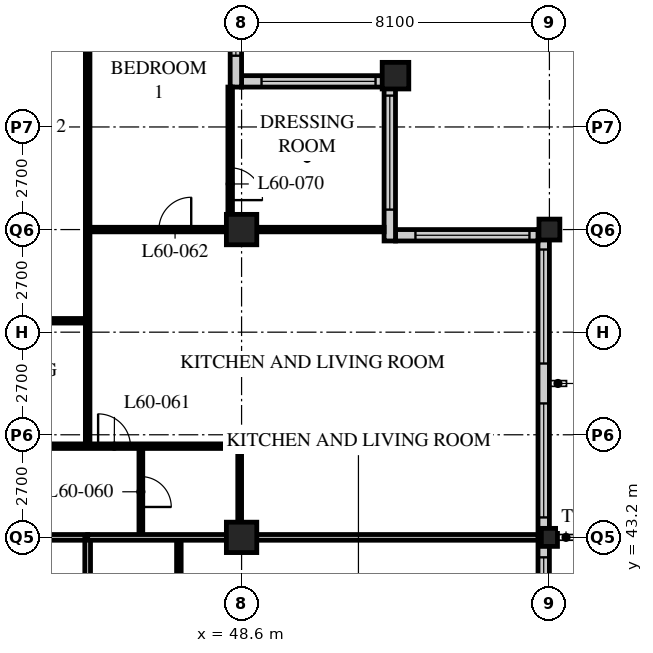
"""IFC4 building model, lengths in metres.
Left out: names, types, materials, properties, quantities, classifications, styles, units other than length and angle.
Written with IfcOpenShell. Run it as: python <this file> out.ifc"""

import sys

from ifc_helpers import new_model, si_unit, direction, frame, frame_2d, origin, origin_2d, place, context, subcontext, project, spatial, rectangle, hollow_rectangle, i_section, extrude, element, fill, save


model = new_model("IFC4")
c1 = context("Model", 3, precision=1e-05, world=origin(), true_north=direction((0.0, 1.0)))
c2 = subcontext(c1, "Body", "Model", "MODEL_VIEW")
j1 = project(units=[si_unit("LENGTHUNIT", "METRE"), si_unit("PLANEANGLEUNIT", "RADIAN")], contexts=[c1])
p1 = place(None, origin())
s1 = spatial("IfcSite", under=j1, at=p1, CompositionType="ELEMENT")
p2 = place(p1, origin())
s2 = spatial("IfcBuilding", under=s1, at=p2, CompositionType="ELEMENT")
p3 = place(p2, frame((0.0, 0.0, 231.6)))
s3 = spatial("IfcBuildingStorey", under=s2, at=p3, CompositionType="ELEMENT", Elevation=231.6)
for number, where, z_axis, x_axis in (
    (1, (48.6, 43.2, 0.0), (0.0, 0.0, 1.0), (1.0, 0.0, 0.0)),
    (2, (48.6, 51.3, 0.0), (0.0, 0.0, 1.0), (1.0, 0.0, 0.0)),
):
    element("IfcColumn", number, at=place(p3, frame(where, z_axis=z_axis, x_axis=x_axis)), inside=s3, PredefinedType="COLUMN", context=c2, shape_type="SweptSolid", body=[
        extrude(hollow_rectangle(XDim=0.8, YDim=0.8, WallThickness=0.08, at=origin_2d()), origin(), (0.0, 0.0, 1.0), 3.6),
    ])
p4 = place(p3, frame((52.65, 55.35, 0.0), z_axis=(0.0, 0.0, 1.0), x_axis=(1.0, 0.0, 0.0)))
e3 = element("IfcColumn", 3, at=p4, inside=s3, PredefinedType="COLUMN", context=c2, shape_type="SweptSolid", body=[
    extrude(hollow_rectangle(XDim=0.7, YDim=0.7, WallThickness=0.07, at=origin_2d()), origin(), (0.0, 0.0, 1.0), 3.6),
])
p5 = place(p3, frame((56.7, 43.2, 0.0), z_axis=(0.0, 0.0, 1.0), x_axis=(1.0, 0.0, 0.0)))
e4 = element("IfcColumn", 4, at=p5, inside=s3, PredefinedType="COLUMN", context=c2, shape_type="SweptSolid", body=[
    extrude(i_section(OverallWidth=0.424, OverallDepth=0.475, WebThickness=0.048, FlangeThickness=0.077, FilletRadius=0.015, at=origin_2d()), origin(), (0.0, 0.0, 1.0), 3.6),
])
p6 = place(p3, frame((56.7, 51.3, 0.0), z_axis=(0.0, 0.0, 1.0), x_axis=(1.0, 0.0, 0.0)))
e5 = element("IfcColumn", 5, at=p6, inside=s3, PredefinedType="COLUMN", context=c2, shape_type="SweptSolid", body=[
    extrude(hollow_rectangle(XDim=0.55, YDim=0.55, WallThickness=0.045, at=origin_2d()), origin(), (0.0, 0.0, 1.0), 3.6),
])
p7 = place(p3, frame((56.55, 19.2, 0.0), z_axis=(0.0, 0.0, 1.0), x_axis=(0.0, 1.0, 0.0)))
e6 = element("IfcWall", 6, at=p7, inside=s3, PredefinedType="SOLIDWALL", context=c2, shape_type="SweptSolid", body=[
    extrude(rectangle(XDim=32.1, YDim=0.3, at=frame_2d((16.05, 0.0))), origin(), (0.0, 0.0, 1.0), 2.35),
])
p8 = place(p7, frame((0.225, 0.0, 0.6)))
e7 = element("IfcOpeningElement", 7, at=p8, cuts=e6, PredefinedType="OPENING", context=c2, shape_type="SweptSolid", body=[
    extrude(rectangle(XDim=3.0, YDim=1.7, at=frame_2d((1.5, 0.85))), frame((0.0, 0.16, 0.0), z_axis=(0.0, -1.0, 0.0), x_axis=(1.0, 0.0, 0.0)), (0.0, 0.0, 1.0), 0.32),
])
p9 = place(p7, frame((4.275, 0.0, 0.6)))
e8 = element("IfcOpeningElement", 8, at=p9, cuts=e6, PredefinedType="OPENING", context=c2, shape_type="SweptSolid", body=[
    extrude(rectangle(XDim=3.0, YDim=1.7, at=frame_2d((1.5, 0.85))), frame((0.0, 0.16, 0.0), z_axis=(0.0, -1.0, 0.0), x_axis=(1.0, 0.0, 0.0)), (0.0, 0.0, 1.0), 0.32),
])
p10 = place(p7, frame((8.325, 0.0, 0.6)))
e9 = element("IfcOpeningElement", 9, at=p10, cuts=e6, PredefinedType="OPENING", context=c2, shape_type="SweptSolid", body=[
    extrude(rectangle(XDim=3.0, YDim=1.7, at=frame_2d((1.5, 0.85))), frame((0.0, 0.16, 0.0), z_axis=(0.0, -1.0, 0.0), x_axis=(1.0, 0.0, 0.0)), (0.0, 0.0, 1.0), 0.32),
])
p11 = place(p7, frame((12.375, 0.0, 0.6)))
e10 = element("IfcOpeningElement", 10, at=p11, cuts=e6, PredefinedType="OPENING", context=c2, shape_type="SweptSolid", body=[
    extrude(rectangle(XDim=3.0, YDim=1.7, at=frame_2d((1.5, 0.85))), frame((0.0, 0.16, 0.0), z_axis=(0.0, -1.0, 0.0), x_axis=(1.0, 0.0, 0.0)), (0.0, 0.0, 1.0), 0.32),
])
p12 = place(p7, frame((16.425, 0.0, 0.6)))
e11 = element("IfcOpeningElement", 11, at=p12, cuts=e6, PredefinedType="OPENING", context=c2, shape_type="SweptSolid", body=[
    extrude(rectangle(XDim=3.0, YDim=1.7, at=frame_2d((1.5, 0.85))), frame((0.0, 0.16, 0.0), z_axis=(0.0, -1.0, 0.0), x_axis=(1.0, 0.0, 0.0)), (0.0, 0.0, 1.0), 0.32),
])
p13 = place(p7, frame((20.475, 0.0, 0.6)))
e12 = element("IfcOpeningElement", 12, at=p13, cuts=e6, PredefinedType="OPENING", context=c2, shape_type="SweptSolid", body=[
    extrude(rectangle(XDim=3.0, YDim=1.7, at=frame_2d((1.5, 0.85))), frame((0.0, 0.16, 0.0), z_axis=(0.0, -1.0, 0.0), x_axis=(1.0, 0.0, 0.0)), (0.0, 0.0, 1.0), 0.32),
])
p14 = place(p7, frame((24.525, 0.0, 0.6)))
e13 = element("IfcOpeningElement", 13, at=p14, cuts=e6, PredefinedType="OPENING", context=c2, shape_type="SweptSolid", body=[
    extrude(rectangle(XDim=3.0, YDim=1.7, at=frame_2d((1.5, 0.85))), frame((0.0, 0.16, 0.0), z_axis=(0.0, -1.0, 0.0), x_axis=(1.0, 0.0, 0.0)), (0.0, 0.0, 1.0), 0.32),
])
p15 = place(p7, frame((28.575, 0.0, 0.6)))
e14 = element("IfcOpeningElement", 14, at=p15, cuts=e6, PredefinedType="OPENING", context=c2, shape_type="SweptSolid", body=[
    extrude(rectangle(XDim=3.0, YDim=1.7, at=frame_2d((1.5, 0.85))), frame((0.0, 0.16, 0.0), z_axis=(0.0, -1.0, 0.0), x_axis=(1.0, 0.0, 0.0)), (0.0, 0.0, 1.0), 0.32),
])
p16 = place(p3, frame((56.4, 51.15, 0.0), z_axis=(0.0, 0.0, 1.0), x_axis=(-1.0, 0.0, 0.0)))
e15 = element("IfcWall", 15, at=p16, inside=s3, PredefinedType="SOLIDWALL", context=c2, shape_type="SweptSolid", body=[
    extrude(rectangle(XDim=3.75, YDim=0.3, at=frame_2d((1.875, 0.0))), origin(), (0.0, 0.0, 1.0), 3.35),
])
p17 = place(p16, frame((0.225, 0.0, 0.6)))
e16 = element("IfcOpeningElement", 16, at=p17, cuts=e15, PredefinedType="OPENING", context=c2, shape_type="SweptSolid", body=[
    extrude(rectangle(XDim=3.0, YDim=1.7, at=frame_2d((1.5, 0.85))), frame((0.0, 0.16, 0.0), z_axis=(0.0, -1.0, 0.0), x_axis=(1.0, 0.0, 0.0)), (0.0, 0.0, 1.0), 0.32),
])
p18 = place(p3, frame((52.5, 51.0, 0.0), z_axis=(0.0, 0.0, 1.0), x_axis=(0.0, 1.0, 0.0)))
e17 = element("IfcWall", 17, at=p18, inside=s3, PredefinedType="SOLIDWALL", context=c2, shape_type="SweptSolid", body=[
    extrude(rectangle(XDim=4.35, YDim=0.3, at=frame_2d((2.175, 0.0))), origin(), (0.0, 0.0, 1.0), 2.65),
])
p19 = place(p18, frame((0.825, 0.0, 0.6)))
e18 = element("IfcOpeningElement", 18, at=p19, cuts=e17, PredefinedType="OPENING", context=c2, shape_type="SweptSolid", body=[
    extrude(rectangle(XDim=3.0, YDim=1.7, at=frame_2d((1.5, 0.85))), frame((0.0, 0.16, 0.0), z_axis=(0.0, -1.0, 0.0), x_axis=(1.0, 0.0, 0.0)), (0.0, 0.0, 1.0), 0.32),
])
p20 = place(p3, frame((52.35, 55.2, 0.0), z_axis=(0.0, 0.0, 1.0), x_axis=(-1.0, 0.0, 0.0)))
e19 = element("IfcWall", 19, at=p20, inside=s3, PredefinedType="SOLIDWALL", context=c2, shape_type="SweptSolid", body=[
    extrude(rectangle(XDim=3.75, YDim=0.3, at=frame_2d((1.875, 0.0))), origin(), (0.0, 0.0, 1.0), 2.65),
])
p21 = place(p20, frame((0.225, 0.0, 0.6)))
e20 = element("IfcOpeningElement", 20, at=p21, cuts=e19, PredefinedType="OPENING", context=c2, shape_type="SweptSolid", body=[
    extrude(rectangle(XDim=3.0, YDim=1.7, at=frame_2d((1.5, 0.85))), frame((0.0, 0.16, 0.0), z_axis=(0.0, -1.0, 0.0), x_axis=(1.0, 0.0, 0.0)), (0.0, 0.0, 1.0), 0.32),
])
p22 = place(p3, frame((48.45, 55.05, 0.0), z_axis=(0.0, 0.0, 1.0), x_axis=(0.0, 1.0, 0.0)))
e21 = element("IfcWall", 21, at=p22, inside=s3, PredefinedType="SOLIDWALL", context=c2, shape_type="SweptSolid", body=[
    extrude(rectangle(XDim=4.35, YDim=0.3, at=frame_2d((2.175, 0.0))), origin(), (0.0, 0.0, 1.0), 2.35),
])
p23 = place(p22, frame((0.825, 0.0, 0.6)))
e22 = element("IfcOpeningElement", 22, at=p23, cuts=e21, PredefinedType="OPENING", context=c2, shape_type="SweptSolid", body=[
    extrude(rectangle(XDim=3.0, YDim=1.7, at=frame_2d((1.5, 0.85))), frame((0.0, 0.16, 0.0), z_axis=(0.0, -1.0, 0.0), x_axis=(1.0, 0.0, 0.0)), (0.0, 0.0, 1.0), 0.32),
])
p24 = place(p3, frame((8.1, 43.2, 0.0), z_axis=(0.0, 0.0, 1.0), x_axis=(1.0, 0.0, 0.0)))
e23 = element("IfcWall", 23, at=p24, inside=s3, PredefinedType="PARTITIONING", context=c2, shape_type="SweptSolid", body=[
    extrude(rectangle(XDim=36.45, YDim=0.15, at=frame_2d((18.225, 0.0))), origin(), (0.0, 0.0, 1.0), 2.35),
])
p25 = place(p24, frame((4.45, 0.0, 0.0)))
e24 = element("IfcOpeningElement", 24, at=p25, cuts=e23, PredefinedType="OPENING", context=c2, shape_type="SweptSolid", body=[
    extrude(rectangle(XDim=1.0, YDim=2.1, at=frame_2d((0.5, 1.05))), frame((0.0, 0.085, 0.0), z_axis=(0.0, -1.0, 0.0), x_axis=(1.0, 0.0, 0.0)), (0.0, 0.0, 1.0), 0.17),
])
p26 = place(p24, frame((17.1, 0.0, 0.0)))
e25 = element("IfcOpeningElement", 25, at=p26, cuts=e23, PredefinedType="OPENING", context=c2, shape_type="SweptSolid", body=[
    extrude(rectangle(XDim=1.0, YDim=2.1, at=frame_2d((0.5, 1.05))), frame((0.0, 0.085, 0.0), z_axis=(0.0, -1.0, 0.0), x_axis=(1.0, 0.0, 0.0)), (0.0, 0.0, 1.0), 0.17),
])
p27 = place(p24, frame((29.05, 0.0, 0.0)))
e26 = element("IfcOpeningElement", 26, at=p27, cuts=e23, PredefinedType="OPENING", context=c2, shape_type="SweptSolid", body=[
    extrude(rectangle(XDim=1.0, YDim=2.1, at=frame_2d((0.5, 1.05))), frame((0.0, 0.085, 0.0), z_axis=(0.0, -1.0, 0.0), x_axis=(1.0, 0.0, 0.0)), (0.0, 0.0, 1.0), 0.17),
])
p28 = place(p24, frame((33.925, 0.0, 0.0)))
e27 = element("IfcOpeningElement", 27, at=p28, cuts=e23, PredefinedType="OPENING", context=c2, shape_type="SweptSolid", body=[
    extrude(rectangle(XDim=1.0, YDim=2.1, at=frame_2d((0.5, 1.05))), frame((0.0, 0.085, 0.0), z_axis=(0.0, -1.0, 0.0), x_axis=(1.0, 0.0, 0.0)), (0.0, 0.0, 1.0), 0.17),
])
p29 = place(p24, frame((1.525, 0.0, 0.0)))
e28 = element("IfcOpeningElement", 28, at=p29, cuts=e23, PredefinedType="OPENING", context=c2, shape_type="SweptSolid", body=[
    extrude(rectangle(XDim=1.0, YDim=2.1, at=frame_2d((0.5, 1.05))), frame((0.0, 0.085, 0.0), z_axis=(0.0, -1.0, 0.0), x_axis=(1.0, 0.0, 0.0)), (0.0, 0.0, 1.0), 0.17),
])
p30 = place(p3, frame((44.55, 18.9, 0.0), z_axis=(0.0, 0.0, 1.0), x_axis=(0.0, 1.0, 0.0)))
e29 = element("IfcWall", 29, at=p30, inside=s3, PredefinedType="PARTITIONING", context=c2, shape_type="SweptSolid", body=[
    extrude(rectangle(XDim=24.3, YDim=0.15, at=frame_2d((12.15, 0.0))), origin(), (0.0, 0.0, 1.0), 3.35),
])
p31 = place(p30, frame((0.4, 0.0, 0.0)))
e30 = element("IfcOpeningElement", 30, at=p31, cuts=e29, PredefinedType="OPENING", context=c2, shape_type="SweptSolid", body=[
    extrude(rectangle(XDim=1.0, YDim=2.1, at=frame_2d((0.5, 1.05))), frame((0.0, 0.085, 0.0), z_axis=(0.0, -1.0, 0.0), x_axis=(1.0, 0.0, 0.0)), (0.0, 0.0, 1.0), 0.17),
])
p32 = place(p30, frame((16.6, 0.0, 0.0)))
e31 = element("IfcOpeningElement", 31, at=p32, cuts=e29, PredefinedType="OPENING", context=c2, shape_type="SweptSolid", body=[
    extrude(rectangle(XDim=1.0, YDim=2.1, at=frame_2d((0.5, 1.05))), frame((0.0, 0.085, 0.0), z_axis=(0.0, -1.0, 0.0), x_axis=(1.0, 0.0, 0.0)), (0.0, 0.0, 1.0), 0.17),
])
p33 = place(p3, frame((46.95, 18.9, 0.0), z_axis=(0.0, 0.0, 1.0), x_axis=(0.0, 1.0, 0.0)))
e32 = element("IfcWall", 32, at=p33, inside=s3, PredefinedType="PARTITIONING", context=c2, shape_type="SweptSolid", body=[
    extrude(rectangle(XDim=24.3, YDim=0.12, at=frame_2d((12.15, 0.0))), origin(), (0.0, 0.0, 1.0), 3.35),
])
p34 = place(p33, frame((0.975, 0.0, 0.0)))
e33 = element("IfcOpeningElement", 33, at=p34, cuts=e32, PredefinedType="OPENING", context=c2, shape_type="SweptSolid", body=[
    extrude(rectangle(XDim=0.85, YDim=2.1, at=frame_2d((0.425, 1.05))), frame((0.0, 0.07, 0.0), z_axis=(0.0, -1.0, 0.0), x_axis=(1.0, 0.0, 0.0)), (0.0, 0.0, 1.0), 0.14),
])
p35 = place(p33, frame((8.425, 0.0, 0.0)))
e34 = element("IfcOpeningElement", 34, at=p35, cuts=e32, PredefinedType="OPENING", context=c2, shape_type="SweptSolid", body=[
    extrude(rectangle(XDim=0.85, YDim=2.1, at=frame_2d((0.425, 1.05))), frame((0.0, 0.07, 0.0), z_axis=(0.0, -1.0, 0.0), x_axis=(1.0, 0.0, 0.0)), (0.0, 0.0, 1.0), 0.14),
])
p36 = place(p33, frame((12.475, 0.0, 0.0)))
e35 = element("IfcOpeningElement", 35, at=p36, cuts=e32, PredefinedType="OPENING", context=c2, shape_type="SweptSolid", body=[
    extrude(rectangle(XDim=0.85, YDim=2.1, at=frame_2d((0.425, 1.05))), frame((0.0, 0.07, 0.0), z_axis=(0.0, -1.0, 0.0), x_axis=(1.0, 0.0, 0.0)), (0.0, 0.0, 1.0), 0.14),
])
p37 = place(p33, frame((17.175, 0.0, 0.0)))
e36 = element("IfcOpeningElement", 36, at=p37, cuts=e32, PredefinedType="OPENING", context=c2, shape_type="SweptSolid", body=[
    extrude(rectangle(XDim=0.85, YDim=2.1, at=frame_2d((0.425, 1.05))), frame((0.0, 0.07, 0.0), z_axis=(0.0, -1.0, 0.0), x_axis=(1.0, 0.0, 0.0)), (0.0, 0.0, 1.0), 0.14),
])
p38 = place(p33, frame((20.575, 0.0, 0.0)))
e37 = element("IfcOpeningElement", 37, at=p38, cuts=e32, PredefinedType="OPENING", context=c2, shape_type="SweptSolid", body=[
    extrude(rectangle(XDim=0.85, YDim=2.1, at=frame_2d((0.425, 1.05))), frame((0.0, 0.07, 0.0), z_axis=(0.0, -1.0, 0.0), x_axis=(1.0, 0.0, 0.0)), (0.0, 0.0, 1.0), 0.14),
])
p39 = place(p3, frame((40.5, 45.6, 0.0), z_axis=(0.0, 0.0, 1.0), x_axis=(1.0, 0.0, 0.0)))
e38 = element("IfcWall", 38, at=p39, inside=s3, PredefinedType="PARTITIONING", context=c2, shape_type="SweptSolid", body=[
    extrude(rectangle(XDim=8.05, YDim=0.12, at=frame_2d((4.025, 0.0))), origin(), (0.0, 0.0, 1.0), 3.35),
])
p40 = place(p39, frame((0.475, 0.0, 0.0)))
e39 = element("IfcOpeningElement", 39, at=p40, cuts=e38, PredefinedType="OPENING", context=c2, shape_type="SweptSolid", body=[
    extrude(rectangle(XDim=0.85, YDim=2.1, at=frame_2d((0.425, 1.05))), frame((0.0, 0.07, 0.0), z_axis=(0.0, -1.0, 0.0), x_axis=(1.0, 0.0, 0.0)), (0.0, 0.0, 1.0), 0.14),
])
p41 = place(p39, frame((4.325, 0.0, 0.0)))
e40 = element("IfcOpeningElement", 40, at=p41, cuts=e38, PredefinedType="OPENING", context=c2, shape_type="SweptSolid", body=[
    extrude(rectangle(XDim=0.85, YDim=2.1, at=frame_2d((0.425, 1.05))), frame((0.0, 0.07, 0.0), z_axis=(0.0, -1.0, 0.0), x_axis=(1.0, 0.0, 0.0)), (0.0, 0.0, 1.0), 0.14),
])
p42 = place(p3, frame((45.95, 43.2, 0.0), z_axis=(0.0, 0.0, 1.0), x_axis=(0.0, 1.0, 0.0)))
e41 = element("IfcWall", 41, at=p42, inside=s3, PredefinedType="PARTITIONING", context=c2, shape_type="SweptSolid", body=[
    extrude(rectangle(XDim=2.4, YDim=0.1, at=frame_2d((1.2, 0.0))), origin(), (0.0, 0.0, 1.0), 3.35),
])
p43 = place(p42, frame((0.8, 0.0, 0.0)))
e42 = element("IfcOpeningElement", 42, at=p43, cuts=e41, PredefinedType="OPENING", context=c2, shape_type="SweptSolid", body=[
    extrude(rectangle(XDim=0.8, YDim=2.1, at=frame_2d((0.4, 1.05))), frame((0.0, 0.06, 0.0), z_axis=(0.0, -1.0, 0.0), x_axis=(1.0, 0.0, 0.0)), (0.0, 0.0, 1.0), 0.12),
])
p44 = place(p3, frame((48.55, 43.2, 0.0), z_axis=(0.0, 0.0, 1.0), x_axis=(0.0, 1.0, 0.0)))
e43 = element("IfcWall", 43, at=p44, inside=s3, PredefinedType="PARTITIONING", context=c2, shape_type="SweptSolid", body=[
    extrude(rectangle(XDim=2.4, YDim=0.1, at=frame_2d((1.2, 0.0))), origin(), (0.0, 0.0, 1.0), 2.35),
])
p45 = place(p3, frame((44.55, 45.6, 0.0), z_axis=(0.0, 0.0, 1.0), x_axis=(0.0, 1.0, 0.0)))
e44 = element("IfcWall", 44, at=p45, inside=s3, PredefinedType="PARTITIONING", context=c2, shape_type="SweptSolid", body=[
    extrude(rectangle(XDim=13.5, YDim=0.12, at=frame_2d((6.75, 0.0))), origin(), (0.0, 0.0, 1.0), 3.35),
])
p46 = place(p3, frame((44.55, 51.3, 0.0), z_axis=(0.0, 0.0, 1.0), x_axis=(1.0, 0.0, 0.0)))
e45 = element("IfcWall", 45, at=p46, inside=s3, PredefinedType="PARTITIONING", context=c2, shape_type="SweptSolid", body=[
    extrude(rectangle(XDim=7.8, YDim=0.12, at=frame_2d((3.9, 0.0))), origin(), (0.0, 0.0, 1.0), 2.588),
])
p47 = place(p46, frame((1.875, 0.0, 0.0)))
e46 = element("IfcOpeningElement", 46, at=p47, cuts=e45, PredefinedType="OPENING", context=c2, shape_type="SweptSolid", body=[
    extrude(rectangle(XDim=0.85, YDim=2.1, at=frame_2d((0.425, 1.05))), frame((0.0, 0.07, 0.0), z_axis=(0.0, -1.0, 0.0), x_axis=(1.0, 0.0, 0.0)), (0.0, 0.0, 1.0), 0.14),
])
p48 = place(p3, frame((44.55, 43.2, 0.0), z_axis=(0.0, 0.0, 1.0), x_axis=(1.0, 0.0, 0.0)))
e47 = element("IfcWall", 47, at=p48, inside=s3, PredefinedType="PARTITIONING", context=c2, shape_type="SweptSolid", body=[
    extrude(rectangle(XDim=11.85, YDim=0.15, at=frame_2d((5.925, 0.0))), origin(), (0.0, 0.0, 1.0), 2.35),
])
p49 = place(p3, frame((48.3, 51.3, 0.0), z_axis=(0.0, 0.0, 1.0), x_axis=(0.0, 1.0, 0.0)))
e48 = element("IfcWall", 48, at=p49, inside=s3, PredefinedType="PARTITIONING", context=c2, shape_type="SweptSolid", body=[
    extrude(rectangle(XDim=3.75, YDim=0.12, at=frame_2d((1.875, 0.0))), origin(), (0.0, 0.0, 1.0), 2.35),
])
p50 = place(p49, frame((0.775, 0.0, 0.0)))
e49 = element("IfcOpeningElement", 49, at=p50, cuts=e48, PredefinedType="OPENING", context=c2, shape_type="SweptSolid", body=[
    extrude(rectangle(XDim=0.85, YDim=2.1, at=frame_2d((0.425, 1.05))), frame((0.0, 0.07, 0.0), z_axis=(0.0, -1.0, 0.0), x_axis=(1.0, 0.0, 0.0)), (0.0, 0.0, 1.0), 0.14),
])
p51 = place(p3, frame((40.5, 48.9, 0.0), z_axis=(0.0, 0.0, 1.0), x_axis=(1.0, 0.0, 0.0)))
e50 = element("IfcWall", 50, at=p51, inside=s3, PredefinedType="PARTITIONING", context=c2, shape_type="SweptSolid", body=[
    extrude(rectangle(XDim=4.05, YDim=0.12, at=frame_2d((2.025, 0.0))), origin(), (0.0, 0.0, 1.0), 3.35),
])
p52 = place(p51, frame((1.6, 0.0, 0.0)))
e51 = element("IfcOpeningElement", 51, at=p52, cuts=e50, PredefinedType="OPENING", context=c2, shape_type="SweptSolid", body=[
    extrude(rectangle(XDim=0.85, YDim=2.1, at=frame_2d((0.425, 1.05))), frame((0.0, 0.07, 0.0), z_axis=(0.0, -1.0, 0.0), x_axis=(1.0, 0.0, 0.0)), (0.0, 0.0, 1.0), 0.14),
])
p53 = place(p13, origin())
e52 = element("IfcWindow", 52, at=p53, inside=s3, PartitioningType="SINGLE_PANEL", PredefinedType="WINDOW", context=c2, shape_type="SweptSolid", body=[
    extrude(rectangle(XDim=3.0, YDim=1.7, at=frame_2d((1.5, 0.85))), frame((0.0, 0.03, 0.0), z_axis=(0.0, -1.0, 0.0), x_axis=(1.0, 0.0, 0.0)), (0.0, 0.0, 1.0), 0.06),
])
fill(e12, e52)
p54 = place(p14, origin())
e53 = element("IfcWindow", 53, at=p54, inside=s3, PartitioningType="SINGLE_PANEL", PredefinedType="WINDOW", context=c2, shape_type="SweptSolid", body=[
    extrude(rectangle(XDim=3.0, YDim=1.7, at=frame_2d((1.5, 0.85))), frame((0.0, 0.03, 0.0), z_axis=(0.0, -1.0, 0.0), x_axis=(1.0, 0.0, 0.0)), (0.0, 0.0, 1.0), 0.06),
])
fill(e13, e53)
p55 = place(p15, origin())
e54 = element("IfcWindow", 54, at=p55, inside=s3, PartitioningType="SINGLE_PANEL", PredefinedType="WINDOW", context=c2, shape_type="SweptSolid", body=[
    extrude(rectangle(XDim=3.0, YDim=1.7, at=frame_2d((1.5, 0.85))), frame((0.0, 0.03, 0.0), z_axis=(0.0, -1.0, 0.0), x_axis=(1.0, 0.0, 0.0)), (0.0, 0.0, 1.0), 0.06),
])
fill(e14, e54)
p56 = place(p17, origin())
e55 = element("IfcWindow", 55, at=p56, inside=s3, PartitioningType="SINGLE_PANEL", PredefinedType="WINDOW", context=c2, shape_type="SweptSolid", body=[
    extrude(rectangle(XDim=3.0, YDim=1.7, at=frame_2d((1.5, 0.85))), frame((0.0, 0.03, 0.0), z_axis=(0.0, -1.0, 0.0), x_axis=(1.0, 0.0, 0.0)), (0.0, 0.0, 1.0), 0.06),
])
fill(e16, e55)
p57 = place(p19, origin())
e56 = element("IfcWindow", 56, at=p57, inside=s3, PartitioningType="SINGLE_PANEL", PredefinedType="WINDOW", context=c2, shape_type="SweptSolid", body=[
    extrude(rectangle(XDim=3.0, YDim=1.7, at=frame_2d((1.5, 0.85))), frame((0.0, 0.03, 0.0), z_axis=(0.0, -1.0, 0.0), x_axis=(1.0, 0.0, 0.0)), (0.0, 0.0, 1.0), 0.06),
])
fill(e18, e56)
p58 = place(p21, origin())
e57 = element("IfcWindow", 57, at=p58, inside=s3, PartitioningType="SINGLE_PANEL", PredefinedType="WINDOW", context=c2, shape_type="SweptSolid", body=[
    extrude(rectangle(XDim=3.0, YDim=1.7, at=frame_2d((1.5, 0.85))), frame((0.0, 0.03, 0.0), z_axis=(0.0, -1.0, 0.0), x_axis=(1.0, 0.0, 0.0)), (0.0, 0.0, 1.0), 0.06),
])
fill(e20, e57)
p59 = place(p23, origin())
e58 = element("IfcWindow", 58, at=p59, inside=s3, PartitioningType="SINGLE_PANEL", PredefinedType="WINDOW", context=c2, shape_type="SweptSolid", body=[
    extrude(rectangle(XDim=3.0, YDim=1.7, at=frame_2d((1.5, 0.85))), frame((0.0, 0.03, 0.0), z_axis=(0.0, -1.0, 0.0), x_axis=(1.0, 0.0, 0.0)), (0.0, 0.0, 1.0), 0.06),
])
fill(e22, e58)
p60 = place(p43, origin())
e59 = element("IfcDoor", 59, at=p60, inside=s3, OperationType="SINGLE_SWING_RIGHT", PredefinedType="DOOR", context=c2, shape_type="SweptSolid", body=[
    extrude(rectangle(XDim=0.8, YDim=2.1, at=frame_2d((0.4, 1.05))), frame((0.0, 0.025, 0.0), z_axis=(0.0, -1.0, 0.0), x_axis=(1.0, 0.0, 0.0)), (0.0, 0.0, 1.0), 0.05),
])
fill(e42, e59)
p61 = place(p41, origin())
e60 = element("IfcDoor", 60, at=p61, inside=s3, OperationType="SINGLE_SWING_LEFT", PredefinedType="DOOR", context=c2, shape_type="SweptSolid", body=[
    extrude(rectangle(XDim=0.85, YDim=2.1, at=frame_2d((0.425, 1.05))), frame((0.0, 0.025, 0.0), z_axis=(0.0, -1.0, 0.0), x_axis=(1.0, 0.0, 0.0)), (0.0, 0.0, 1.0), 0.05),
])
fill(e40, e60)
p62 = place(p47, origin())
e61 = element("IfcDoor", 61, at=p62, inside=s3, OperationType="SINGLE_SWING_RIGHT", PredefinedType="DOOR", context=c2, shape_type="SweptSolid", body=[
    extrude(rectangle(XDim=0.85, YDim=2.1, at=frame_2d((0.425, 1.05))), frame((0.0, 0.025, 0.0), z_axis=(0.0, -1.0, 0.0), x_axis=(1.0, 0.0, 0.0)), (0.0, 0.0, 1.0), 0.05),
])
fill(e46, e61)
p63 = place(p50, origin())
e62 = element("IfcDoor", 62, at=p63, inside=s3, OperationType="SINGLE_SWING_RIGHT", PredefinedType="DOOR", context=c2, shape_type="SweptSolid", body=[
    extrude(rectangle(XDim=0.85, YDim=2.1, at=frame_2d((0.425, 1.05))), frame((0.0, 0.025, 0.0), z_axis=(0.0, -1.0, 0.0), x_axis=(1.0, 0.0, 0.0)), (0.0, 0.0, 1.0), 0.05),
])
fill(e49, e62)
save(model, sys.argv[1])
